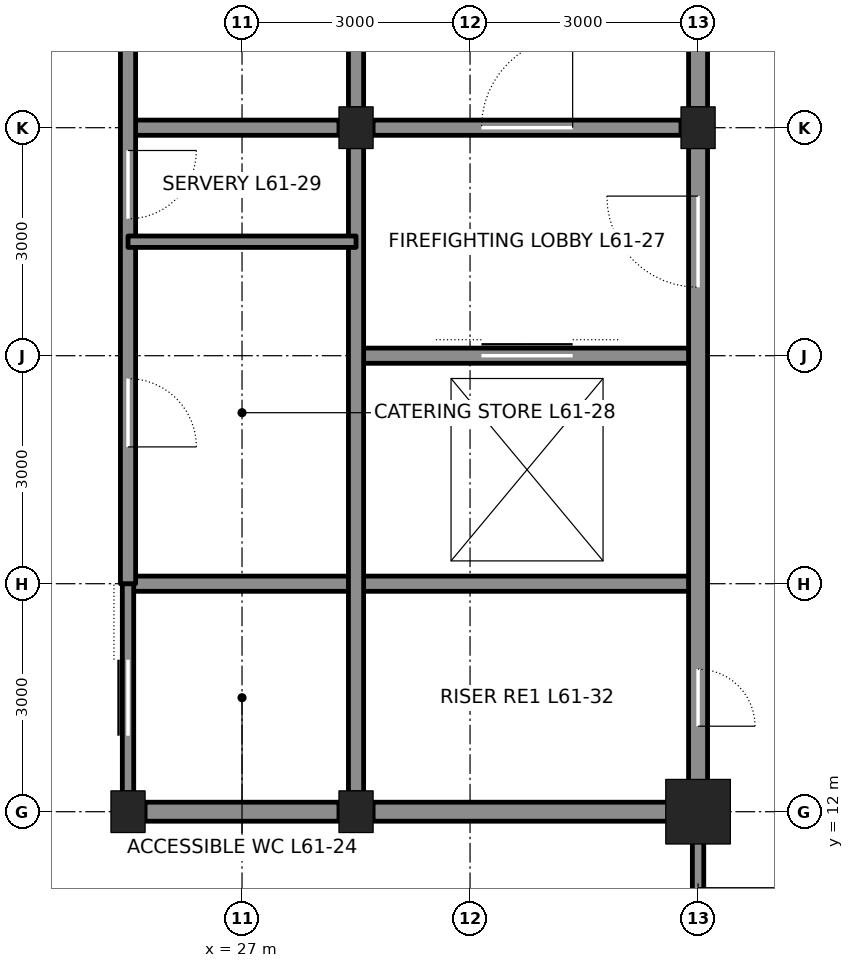
"""IFC4 building model, lengths in metres.
Left out: names, types, materials, properties, quantities, classifications, styles, units other than length and angle.
Written with IfcOpenShell. Run it as: python <this file> out.ifc"""

import sys

from ifc_helpers import new_model, si_unit, direction, frame, frame_2d, origin, origin_2d, place, context, subcontext, project, spatial, rectangle, hollow_rectangle, i_section, extrude, element, fill, save


model = new_model("IFC4")
c1 = context("Model", 3, precision=1e-05, world=origin(), true_north=direction((0.0, 1.0)))
c2 = subcontext(c1, "Body", "Model", "MODEL_VIEW")
j1 = project(units=[si_unit("LENGTHUNIT", "METRE"), si_unit("PLANEANGLEUNIT", "RADIAN")], contexts=[c1])
p1 = place(None, origin())
s1 = spatial("IfcSite", under=j1, at=p1, CompositionType="ELEMENT")
p2 = place(p1, origin())
s2 = spatial("IfcBuilding", under=s1, at=p2, CompositionType="ELEMENT")
p3 = place(p2, frame((0.0, 0.0, 274.8)))
s3 = spatial("IfcBuildingStorey", under=s2, at=p3, CompositionType="ELEMENT", Elevation=274.8)
for number, where, z_axis, x_axis in (
    (1, (25.5, 12.0, 0.0), (0.0, 0.0, 1.0), (1.0, 0.0, 0.0)),
    (2, (28.5, 12.0, 0.0), (0.0, 0.0, 1.0), (1.0, 0.0, 0.0)),
):
    element("IfcColumn", number, at=place(p3, frame(where, z_axis=z_axis, x_axis=x_axis)), inside=s3, PredefinedType="COLUMN", context=c2, shape_type="SweptSolid", body=[
        extrude(i_section(OverallWidth=0.449, OverallDepth=0.549, WebThickness=0.072, FlangeThickness=0.115, at=origin_2d()), origin(), (0.0, 0.0, 1.0), 4.2),
    ])
p4 = place(p3, frame((33.0, 12.0, 0.0), z_axis=(0.0, 0.0, 1.0), x_axis=(1.0, 0.0, 0.0)))
e3 = element("IfcColumn", 3, at=p4, inside=s3, PredefinedType="COLUMN", context=c2, shape_type="SweptSolid", body=[
    extrude(hollow_rectangle(XDim=0.85, YDim=0.85, WallThickness=0.085, at=origin_2d()), origin(), (0.0, 0.0, 1.0), 4.2),
])
for number, where, z_axis, x_axis in (
    (4, (33.0, 21.0, 0.0), (0.0, 0.0, 1.0), (1.0, 0.0, 0.0)),
    (5, (28.5, 21.0, 0.0), (0.0, 0.0, 1.0), (1.0, 0.0, 0.0)),
):
    element("IfcColumn", number, at=place(p3, frame(where, z_axis=z_axis, x_axis=x_axis)), inside=s3, PredefinedType="COLUMN", context=c2, shape_type="SweptSolid", body=[
        extrude(i_section(OverallWidth=0.449, OverallDepth=0.549, WebThickness=0.072, FlangeThickness=0.115, at=origin_2d()), origin(), (0.0, 0.0, 1.0), 4.2),
    ])
p5 = place(p3, frame((25.725, 12.0, 0.0), z_axis=(0.0, 0.0, 1.0), x_axis=(1.0, 0.0, 0.0)))
e6 = element("IfcWall", 6, at=p5, inside=s3, PredefinedType="SOLIDWALL", context=c2, shape_type="SweptSolid", body=[
    extrude(rectangle(XDim=2.55, YDim=0.25, at=frame_2d((1.275, 0.0))), origin(), (0.0, 0.0, 1.0), 3.181),
])
p6 = place(p3, frame((28.725, 12.0, 0.0), z_axis=(0.0, 0.0, 1.0), x_axis=(1.0, 0.0, 0.0)))
e7 = element("IfcWall", 7, at=p6, inside=s3, PredefinedType="SOLIDWALL", context=c2, shape_type="SweptSolid", body=[
    extrude(rectangle(XDim=4.025, YDim=0.25, at=frame_2d((2.013, 0.0))), origin(), (0.0, 0.0, 1.0), 3.181),
])
p7 = place(p3, frame((25.5, 15.0, 0.0), z_axis=(0.0, 0.0, 1.0), x_axis=(1.0, 0.0, 0.0)))
e8 = element("IfcWall", 8, at=p7, inside=s3, PredefinedType="SOLIDWALL", context=c2, shape_type="SweptSolid", body=[
    extrude(rectangle(XDim=7.5, YDim=0.2, at=frame_2d((3.75, 0.0))), origin(), (0.0, 0.0, 1.0), 4.04),
])
p8 = place(p3, frame((28.5, 18.0, 0.0), z_axis=(0.0, 0.0, 1.0), x_axis=(1.0, 0.0, 0.0)))
e9 = element("IfcWall", 9, at=p8, inside=s3, PredefinedType="SOLIDWALL", context=c2, shape_type="SweptSolid", body=[
    extrude(rectangle(XDim=4.5, YDim=0.2, at=frame_2d((2.25, 0.0))), origin(), (0.0, 0.0, 1.0), 4.04),
])
p9 = place(p8, frame((1.65, 0.0, 0.0)))
e10 = element("IfcOpeningElement", 10, at=p9, cuts=e9, PredefinedType="OPENING", context=c2, shape_type="SweptSolid", body=[
    extrude(rectangle(XDim=1.2, YDim=2.1, at=frame_2d((0.6, 1.05))), frame((0.0, 0.11, 0.0), z_axis=(0.0, -1.0, 0.0), x_axis=(1.0, 0.0, 0.0)), (0.0, 0.0, 1.0), 0.22),
])
p10 = place(p3, frame((25.5, 21.0, 0.0), z_axis=(0.0, 0.0, 1.0), x_axis=(1.0, 0.0, 0.0)))
e11 = element("IfcWall", 11, at=p10, inside=s3, PredefinedType="SOLIDWALL", context=c2, shape_type="SweptSolid", body=[
    extrude(rectangle(XDim=2.775, YDim=0.2, at=frame_2d((1.388, 0.0))), origin(), (0.0, 0.0, 1.0), 3.09),
])
p11 = place(p3, frame((28.725, 21.0, 0.0), z_axis=(0.0, 0.0, 1.0), x_axis=(1.0, 0.0, 0.0)))
e12 = element("IfcWall", 12, at=p11, inside=s3, PredefinedType="SOLIDWALL", context=c2, shape_type="SweptSolid", body=[
    extrude(rectangle(XDim=4.05, YDim=0.2, at=frame_2d((2.025, 0.0))), origin(), (0.0, 0.0, 1.0), 3.09),
])
p12 = place(p11, frame((1.425, 0.0, 0.0)))
e13 = element("IfcOpeningElement", 13, at=p12, cuts=e12, PredefinedType="OPENING", context=c2, shape_type="SweptSolid", body=[
    extrude(rectangle(XDim=1.2, YDim=2.1, at=frame_2d((0.6, 1.05))), frame((0.0, 0.11, 0.0), z_axis=(0.0, -1.0, 0.0), x_axis=(1.0, 0.0, 0.0)), (0.0, 0.0, 1.0), 0.22),
])
p13 = place(p3, frame((25.5, 12.25, 0.0), z_axis=(0.0, 0.0, 1.0), x_axis=(0.0, 1.0, 0.0)))
e14 = element("IfcWall", 14, at=p13, inside=s3, PredefinedType="PARTITIONING", context=c2, shape_type="SweptSolid", body=[
    extrude(rectangle(XDim=2.75, YDim=0.15, at=frame_2d((1.375, 0.0))), origin(), (0.0, 0.0, 1.0), 3.064),
])
p14 = place(p13, frame((0.75, 0.0, 0.0)))
e15 = element("IfcOpeningElement", 15, at=p14, cuts=e14, PredefinedType="OPENING", context=c2, shape_type="SweptSolid", body=[
    extrude(rectangle(XDim=1.0, YDim=2.1, at=frame_2d((0.5, 1.05))), frame((0.0, 0.085, 0.0), z_axis=(0.0, -1.0, 0.0), x_axis=(1.0, 0.0, 0.0)), (0.0, 0.0, 1.0), 0.17),
])
p15 = place(p3, frame((25.5, 15.0, 0.0), z_axis=(0.0, 0.0, 1.0), x_axis=(0.0, 1.0, 0.0)))
e16 = element("IfcWall", 16, at=p15, inside=s3, PredefinedType="SOLIDWALL", context=c2, shape_type="SweptSolid", body=[
    extrude(rectangle(XDim=12.0, YDim=0.2, at=frame_2d((6.0, 0.0))), origin(), (0.0, 0.0, 1.0), 3.064),
])
p16 = place(p15, frame((1.8, 0.0, 0.0)))
e17 = element("IfcOpeningElement", 17, at=p16, cuts=e16, PredefinedType="OPENING", context=c2, shape_type="SweptSolid", body=[
    extrude(rectangle(XDim=0.9, YDim=2.1, at=frame_2d((0.45, 1.05))), frame((0.0, 0.11, 0.0), z_axis=(0.0, -1.0, 0.0), x_axis=(1.0, 0.0, 0.0)), (0.0, 0.0, 1.0), 0.22),
])
p17 = place(p15, frame((4.8, 0.0, 0.0)))
e18 = element("IfcOpeningElement", 18, at=p17, cuts=e16, PredefinedType="OPENING", context=c2, shape_type="SweptSolid", body=[
    extrude(rectangle(XDim=0.9, YDim=2.1, at=frame_2d((0.45, 1.05))), frame((0.0, 0.11, 0.0), z_axis=(0.0, -1.0, 0.0), x_axis=(1.0, 0.0, 0.0)), (0.0, 0.0, 1.0), 0.22),
])
p18 = place(p3, frame((28.5, 12.25, 0.0), z_axis=(0.0, 0.0, 1.0), x_axis=(0.0, 1.0, 0.0)))
e19 = element("IfcWall", 19, at=p18, inside=s3, PredefinedType="SOLIDWALL", context=c2, shape_type="SweptSolid", body=[
    extrude(rectangle(XDim=8.5, YDim=0.2, at=frame_2d((4.25, 0.0))), origin(), (0.0, 0.0, 1.0), 3.113),
])
p19 = place(p3, frame((28.5, 21.25, 0.0), z_axis=(0.0, 0.0, 1.0), x_axis=(0.0, 1.0, 0.0)))
e20 = element("IfcWall", 20, at=p19, inside=s3, PredefinedType="SOLIDWALL", context=c2, shape_type="SweptSolid", body=[
    extrude(rectangle(XDim=2.5, YDim=0.2, at=frame_2d((1.25, 0.0))), origin(), (0.0, 0.0, 1.0), 3.113),
])
p20 = place(p3, frame((33.0, 12.25, 0.0), z_axis=(0.0, 0.0, 1.0), x_axis=(0.0, 1.0, 0.0)))
e21 = element("IfcWall", 21, at=p20, inside=s3, PredefinedType="SOLIDWALL", context=c2, shape_type="SweptSolid", body=[
    extrude(rectangle(XDim=8.5, YDim=0.25, at=frame_2d((4.25, 0.0))), origin(), (0.0, 0.0, 1.0), 3.113),
])
p21 = place(p20, frame((6.65, 0.0, 0.0)))
e22 = element("IfcOpeningElement", 22, at=p21, cuts=e21, PredefinedType="OPENING", context=c2, shape_type="SweptSolid", body=[
    extrude(rectangle(XDim=1.2, YDim=2.1, at=frame_2d((0.6, 1.05))), frame((0.0, 0.135, 0.0), z_axis=(0.0, -1.0, 0.0), x_axis=(1.0, 0.0, 0.0)), (0.0, 0.0, 1.0), 0.27),
])
p22 = place(p20, frame((0.875, 0.0, 0.0)))
e23 = element("IfcOpeningElement", 23, at=p22, cuts=e21, PredefinedType="OPENING", context=c2, shape_type="SweptSolid", body=[
    extrude(rectangle(XDim=0.75, YDim=2.1, at=frame_2d((0.375, 1.05))), frame((0.0, 0.135, 0.0), z_axis=(0.0, -1.0, 0.0), x_axis=(1.0, 0.0, 0.0)), (0.0, 0.0, 1.0), 0.27),
])
p23 = place(p3, frame((33.0, 21.25, 0.0), z_axis=(0.0, 0.0, 1.0), x_axis=(0.0, 1.0, 0.0)))
e24 = element("IfcWall", 24, at=p23, inside=s3, PredefinedType="SOLIDWALL", context=c2, shape_type="SweptSolid", body=[
    extrude(rectangle(XDim=2.5, YDim=0.25, at=frame_2d((1.25, 0.0))), origin(), (0.0, 0.0, 1.0), 3.113),
])
p24 = place(p3, frame((25.5, 19.5, 0.0), z_axis=(0.0, 0.0, 1.0), x_axis=(1.0, 0.0, 0.0)))
e25 = element("IfcWall", 25, at=p24, inside=s3, PredefinedType="PARTITIONING", context=c2, shape_type="SweptSolid", body=[
    extrude(rectangle(XDim=3.0, YDim=0.15, at=frame_2d((1.5, 0.0))), origin(), (0.0, 0.0, 1.0), 4.04),
])
p25 = place(p3, frame((33.0, 9.0, 0.0), z_axis=(0.0, 0.0, 1.0), x_axis=(0.0, 1.0, 0.0)))
e26 = element("IfcWall", 26, at=p25, inside=s3, PredefinedType="PARTITIONING", context=c2, shape_type="SweptSolid", body=[
    extrude(rectangle(XDim=3.0, YDim=0.15, at=frame_2d((1.5, 0.0))), origin(), (0.0, 0.0, 1.0), 3.27),
])
p26 = place(p25, frame((1.0, 0.0, 0.0)))
e27 = element("IfcOpeningElement", 27, at=p26, cuts=e26, PredefinedType="OPENING", context=c2, shape_type="SweptSolid", body=[
    extrude(rectangle(XDim=1.0, YDim=2.4, at=frame_2d((0.5, 1.2))), frame((0.0, 0.085, 0.0), z_axis=(0.0, -1.0, 0.0), x_axis=(1.0, 0.0, 0.0)), (0.0, 0.0, 1.0), 0.17),
])
p27 = place(p12, origin())
e28 = element("IfcDoor", 28, at=p27, inside=s3, OperationType="SINGLE_SWING_RIGHT", PredefinedType="DOOR", context=c2, shape_type="SweptSolid", body=[
    extrude(rectangle(XDim=1.2, YDim=2.1, at=frame_2d((0.6, 1.05))), frame((0.0, 0.025, 0.0), z_axis=(0.0, -1.0, 0.0), x_axis=(1.0, 0.0, 0.0)), (0.0, 0.0, 1.0), 0.05),
])
fill(e13, e28)
p28 = place(p21, origin())
e29 = element("IfcDoor", 29, at=p28, inside=s3, OperationType="SINGLE_SWING_RIGHT", PredefinedType="DOOR", context=c2, shape_type="SweptSolid", body=[
    extrude(rectangle(XDim=1.2, YDim=2.1, at=frame_2d((0.6, 1.05))), frame((0.0, 0.025, 0.0), z_axis=(0.0, -1.0, 0.0), x_axis=(1.0, 0.0, 0.0)), (0.0, 0.0, 1.0), 0.05),
])
fill(e22, e29)
p29 = place(p9, origin())
e30 = element("IfcDoor", 30, at=p29, inside=s3, OperationType="DOUBLE_DOOR_SLIDING", PredefinedType="DOOR", context=c2, shape_type="SweptSolid", body=[
    extrude(rectangle(XDim=1.2, YDim=2.1, at=frame_2d((0.6, 1.05))), frame((0.0, 0.025, 0.0), z_axis=(0.0, -1.0, 0.0), x_axis=(1.0, 0.0, 0.0)), (0.0, 0.0, 1.0), 0.05),
])
fill(e10, e30)
p30 = place(p22, frame((0.75, 0.0, 0.0), z_axis=(0.0, 0.0, 1.0), x_axis=(-1.0, 0.0, 0.0)))
e31 = element("IfcDoor", 31, at=p30, inside=s3, OperationType="SINGLE_SWING_RIGHT", PredefinedType="DOOR", context=c2, shape_type="SweptSolid", body=[
    extrude(rectangle(XDim=0.75, YDim=2.1, at=frame_2d((0.375, 1.05))), frame((0.0, 0.025, 0.0), z_axis=(0.0, -1.0, 0.0), x_axis=(1.0, 0.0, 0.0)), (0.0, 0.0, 1.0), 0.05),
])
fill(e23, e31)
p31 = place(p14, origin())
e32 = element("IfcDoor", 32, at=p31, inside=s3, OperationType="SLIDING_TO_LEFT", PredefinedType="DOOR", context=c2, shape_type="SweptSolid", body=[
    extrude(rectangle(XDim=1.0, YDim=2.1, at=frame_2d((0.5, 1.05))), frame((0.0, 0.025, 0.0), z_axis=(0.0, -1.0, 0.0), x_axis=(1.0, 0.0, 0.0)), (0.0, 0.0, 1.0), 0.05),
])
fill(e15, e32)
p32 = place(p16, frame((0.9, 0.0, 0.0), z_axis=(0.0, 0.0, 1.0), x_axis=(-1.0, 0.0, 0.0)))
e33 = element("IfcDoor", 33, at=p32, inside=s3, OperationType="SINGLE_SWING_RIGHT", PredefinedType="DOOR", context=c2, shape_type="SweptSolid", body=[
    extrude(rectangle(XDim=0.9, YDim=2.1, at=frame_2d((0.45, 1.05))), frame((0.0, 0.025, 0.0), z_axis=(0.0, -1.0, 0.0), x_axis=(1.0, 0.0, 0.0)), (0.0, 0.0, 1.0), 0.05),
])
fill(e17, e33)
p33 = place(p17, frame((0.9, 0.0, 0.0), z_axis=(0.0, 0.0, 1.0), x_axis=(-1.0, 0.0, 0.0)))
e34 = element("IfcDoor", 34, at=p33, inside=s3, OperationType="SINGLE_SWING_LEFT", PredefinedType="DOOR", context=c2, shape_type="SweptSolid", body=[
    extrude(rectangle(XDim=0.9, YDim=2.1, at=frame_2d((0.45, 1.05))), frame((0.0, 0.025, 0.0), z_axis=(0.0, -1.0, 0.0), x_axis=(1.0, 0.0, 0.0)), (0.0, 0.0, 1.0), 0.05),
])
fill(e18, e34)
save(model, sys.argv[1])
